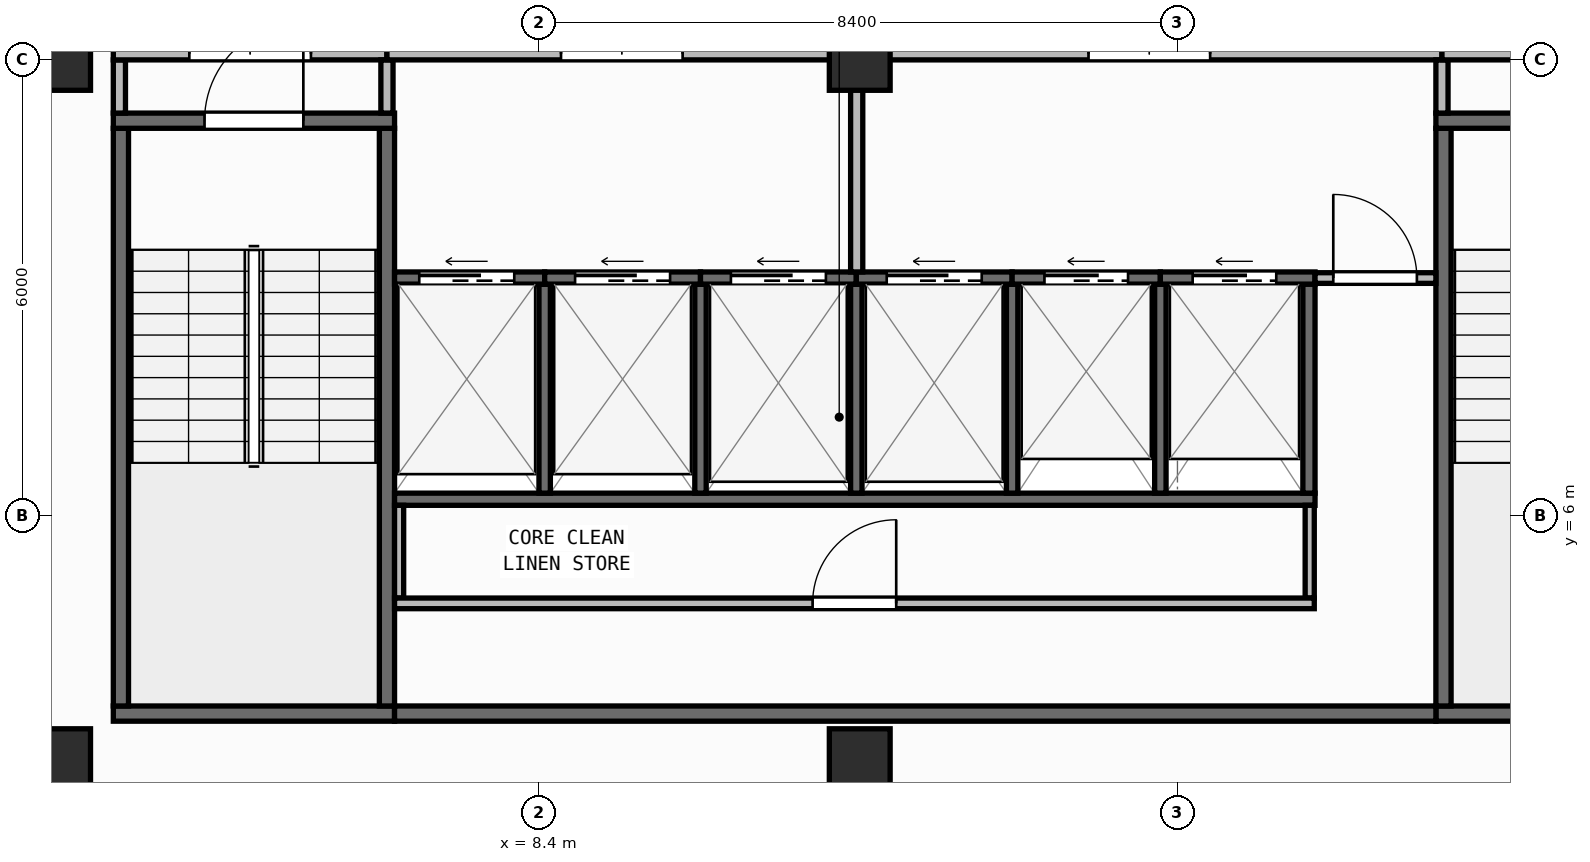
"""IFC4 building model, lengths in metres.
Left out: names, types, materials, properties, quantities, classifications, styles, units other than length and angle.
Written with IfcOpenShell. Run it as: python <this file> out.ifc"""

import sys

from ifc_helpers import new_model, si_unit, direction, frame, frame_2d, origin, origin_2d, place, context, subcontext, project, spatial, rectangle, extrude, element, fill, save


model = new_model("IFC4")
c1 = context("Model", 3, precision=1e-05, world=origin(), true_north=direction((0.0, 1.0)))
c2 = subcontext(c1, "Body", "Model", "MODEL_VIEW")
j1 = project(units=[si_unit("LENGTHUNIT", "METRE"), si_unit("PLANEANGLEUNIT", "RADIAN")], contexts=[c1])
p1 = place(None, origin())
s1 = spatial("IfcSite", under=j1, at=p1, CompositionType="ELEMENT")
p2 = place(p1, origin())
s2 = spatial("IfcBuilding", under=s1, at=p2, CompositionType="ELEMENT")
p3 = place(p2, frame((0.0, 0.0, 292.1)))
s3 = spatial("IfcBuildingStorey", under=s2, at=p3, CompositionType="ELEMENT", Elevation=292.1)
for number, where, z_axis, x_axis in (
    (1, (2.1, 2.8, 0.0), (0.0, 0.0, 1.0), (1.0, 0.0, 0.0)),
    (2, (12.62, 2.8, 0.0), (0.0, 0.0, 1.0), (1.0, 0.0, 0.0)),
    (3, (2.1, 12.0, 0.0), (0.0, 0.0, 1.0), (1.0, 0.0, 0.0)),
    (4, (12.62, 12.0, 0.0), (0.0, 0.0, 1.0), (1.0, 0.0, 0.0)),
):
    element("IfcColumn", number, at=place(p3, frame(where, z_axis=z_axis, x_axis=x_axis)), inside=s3, PredefinedType="COLUMN", context=c2, shape_type="SweptSolid", body=[
        extrude(rectangle(XDim=0.8, YDim=0.8, at=origin_2d()), origin(), (0.0, 0.0, 1.0), 3.95),
    ])
p4 = place(p3, frame((2.46, 0.171, 0.0), z_axis=(0.0, 0.0, 1.0), x_axis=(0.997760665813, 0.066885377746, 0.0)))
e5 = element("IfcWall", 5, at=p4, inside=s3, PredefinedType="STANDARD", context=c2, shape_type="SweptSolid", body=[
    extrude(rectangle(XDim=35.56, YDim=0.26, at=frame_2d((17.78, 0.0))), origin(), (0.0, 0.0, 1.0), 3.71),
])
p5 = place(p4, frame((16.58, 0.0, 0.9)))
e6 = element("IfcOpeningElement", 6, at=p5, cuts=e5, PredefinedType="OPENING", context=c2, shape_type="SweptSolid", body=[
    extrude(rectangle(XDim=2.4, YDim=1.65, at=frame_2d((1.2, 0.825))), frame((0.0, 0.14, 0.0), z_axis=(0.0, -1.0, 0.0), x_axis=(1.0, 0.0, 0.0)), (0.0, 0.0, 1.0), 0.28),
])
p6 = place(p3, frame((2.8, 3.4, 0.0), z_axis=(0.0, 0.0, 1.0), x_axis=(1.0, 0.0, 0.0)))
e7 = element("IfcWall", 7, at=p6, inside=s3, PredefinedType="SHEAR", context=c2, shape_type="SweptSolid", body=[
    extrude(rectangle(XDim=3.7, YDim=0.2, at=frame_2d((1.85, 0.0))), origin(), (0.0, 0.0, 1.0), 3.71),
])
for number, where, z_axis, x_axis in (
    (8, (2.9, 3.5, 0.0), (0.0, 0.0, 1.0), (0.0, 1.0, 0.0)),
    (9, (6.4, 3.5, 0.0), (0.0, 0.0, 1.0), (0.0, 1.0, 0.0)),
):
    element("IfcWall", number, at=place(p3, frame(where, z_axis=z_axis, x_axis=x_axis)), inside=s3, PredefinedType="SHEAR", context=c2, shape_type="SweptSolid", body=[
        extrude(rectangle(XDim=7.6, YDim=0.2, at=frame_2d((3.8, 0.0))), origin(), (0.0, 0.0, 1.0), 3.71),
    ])
p7 = place(p3, frame((2.8, 11.2, 0.0), z_axis=(0.0, 0.0, 1.0), x_axis=(1.0, 0.0, 0.0)))
e10 = element("IfcWall", 10, at=p7, inside=s3, PredefinedType="SHEAR", context=c2, shape_type="SweptSolid", body=[
    extrude(rectangle(XDim=3.7, YDim=0.2, at=frame_2d((1.85, 0.0))), origin(), (0.0, 0.0, 1.0), 3.71),
])
p8 = place(p7, frame((1.2, 0.0, 0.0)))
e11 = element("IfcOpeningElement", 11, at=p8, cuts=e10, PredefinedType="OPENING", context=c2, shape_type="SweptSolid", body=[
    extrude(rectangle(XDim=1.3, YDim=2.15, at=frame_2d((0.65, 1.075))), frame((0.0, 0.11, 0.0), z_axis=(0.0, -1.0, 0.0), x_axis=(1.0, 0.0, 0.0)), (0.0, 0.0, 1.0), 0.22),
])
p9 = place(p3, frame((20.2, 3.4, 0.0), z_axis=(0.0, 0.0, 1.0), x_axis=(1.0, 0.0, 0.0)))
e12 = element("IfcWall", 12, at=p9, inside=s3, PredefinedType="SHEAR", context=c2, shape_type="SweptSolid", body=[
    extrude(rectangle(XDim=3.7, YDim=0.2, at=frame_2d((1.85, 0.0))), origin(), (0.0, 0.0, 1.0), 3.71),
])
p10 = place(p3, frame((20.3, 3.5, 0.0), z_axis=(0.0, 0.0, 1.0), x_axis=(0.0, 1.0, 0.0)))
e13 = element("IfcWall", 13, at=p10, inside=s3, PredefinedType="SHEAR", context=c2, shape_type="SweptSolid", body=[
    extrude(rectangle(XDim=7.6, YDim=0.2, at=frame_2d((3.8, 0.0))), origin(), (0.0, 0.0, 1.0), 3.71),
])
p11 = place(p3, frame((20.2, 11.2, 0.0), z_axis=(0.0, 0.0, 1.0), x_axis=(1.0, 0.0, 0.0)))
e14 = element("IfcWall", 14, at=p11, inside=s3, PredefinedType="SHEAR", context=c2, shape_type="SweptSolid", body=[
    extrude(rectangle(XDim=3.7, YDim=0.2, at=frame_2d((1.85, 0.0))), origin(), (0.0, 0.0, 1.0), 3.71),
])
p12 = place(p11, frame((1.2, 0.0, 0.0)))
e15 = element("IfcOpeningElement", 15, at=p12, cuts=e14, PredefinedType="OPENING", context=c2, shape_type="SweptSolid", body=[
    extrude(rectangle(XDim=1.3, YDim=2.15, at=frame_2d((0.65, 1.075))), frame((0.0, 0.11, 0.0), z_axis=(0.0, -1.0, 0.0), x_axis=(1.0, 0.0, 0.0)), (0.0, 0.0, 1.0), 0.22),
])
p13 = place(p3, frame((6.5, 3.4, 0.0), z_axis=(0.0, 0.0, 1.0), x_axis=(1.0, 0.0, 0.0)))
e16 = element("IfcWall", 16, at=p13, inside=s3, PredefinedType="SHEAR", context=c2, shape_type="SweptSolid", body=[
    extrude(rectangle(XDim=13.7, YDim=0.2, at=frame_2d((6.85, 0.0))), origin(), (0.0, 0.0, 1.0), 3.71),
])
p14 = place(p3, frame((6.5, 6.22, 0.0), z_axis=(0.0, 0.0, 1.0), x_axis=(1.0, 0.0, 0.0)))
e17 = element("IfcWall", 17, at=p14, inside=s3, PredefinedType="SHEAR", context=c2, shape_type="SweptSolid", body=[
    extrude(rectangle(XDim=12.11, YDim=0.16, at=frame_2d((6.055, 0.0))), origin(), (0.0, 0.0, 1.0), 3.71),
])
p15 = place(p3, frame((18.53, 6.3, 0.0), z_axis=(0.0, 0.0, 1.0), x_axis=(0.0, 1.0, 0.0)))
e18 = element("IfcWall", 18, at=p15, inside=s3, PredefinedType="SHEAR", context=c2, shape_type="SweptSolid", body=[
    extrude(rectangle(XDim=2.75, YDim=0.16, at=frame_2d((1.375, 0.0))), origin(), (0.0, 0.0, 1.0), 3.71),
])
for number, where, z_axis, x_axis in (
    (19, (8.475, 6.3, 0.0), (0.0, 0.0, 1.0), (0.0, 1.0, 0.0)),
    (20, (10.525, 6.3, 0.0), (0.0, 0.0, 1.0), (0.0, 1.0, 0.0)),
    (21, (12.575, 6.3, 0.0), (0.0, 0.0, 1.0), (0.0, 1.0, 0.0)),
    (22, (14.625, 6.3, 0.0), (0.0, 0.0, 1.0), (0.0, 1.0, 0.0)),
    (23, (16.575, 6.3, 0.0), (0.0, 0.0, 1.0), (0.0, 1.0, 0.0)),
):
    element("IfcWall", number, at=place(p3, frame(where, z_axis=z_axis, x_axis=x_axis)), inside=s3, PredefinedType="SHEAR", context=c2, shape_type="SweptSolid", body=[
        extrude(rectangle(XDim=2.75, YDim=0.15, at=frame_2d((1.375, 0.0))), origin(), (0.0, 0.0, 1.0), 3.71),
    ])
p16 = place(p3, frame((6.5, 9.13, 0.0), z_axis=(0.0, 0.0, 1.0), x_axis=(1.0, 0.0, 0.0)))
e24 = element("IfcWall", 24, at=p16, inside=s3, PredefinedType="SHEAR", context=c2, shape_type="SweptSolid", body=[
    extrude(rectangle(XDim=1.975, YDim=0.16, at=frame_2d((0.988, 0.0))), origin(), (0.0, 0.0, 1.0), 3.71),
])
p17 = place(p16, frame((0.325, 0.0, 0.0)))
e25 = element("IfcOpeningElement", 25, at=p17, cuts=e24, PredefinedType="OPENING", context=c2, shape_type="SweptSolid", body=[
    extrude(rectangle(XDim=1.25, YDim=2.15, at=frame_2d((0.625, 1.075))), frame((0.0, 0.09, 0.0), z_axis=(0.0, -1.0, 0.0), x_axis=(1.0, 0.0, 0.0)), (0.0, 0.0, 1.0), 0.18),
])
p18 = place(p3, frame((8.475, 9.13, 0.0), z_axis=(0.0, 0.0, 1.0), x_axis=(1.0, 0.0, 0.0)))
e26 = element("IfcWall", 26, at=p18, inside=s3, PredefinedType="SHEAR", context=c2, shape_type="SweptSolid", body=[
    extrude(rectangle(XDim=2.05, YDim=0.16, at=frame_2d((1.025, 0.0))), origin(), (0.0, 0.0, 1.0), 3.71),
])
p19 = place(p18, frame((0.4, 0.0, 0.0)))
e27 = element("IfcOpeningElement", 27, at=p19, cuts=e26, PredefinedType="OPENING", context=c2, shape_type="SweptSolid", body=[
    extrude(rectangle(XDim=1.25, YDim=2.15, at=frame_2d((0.625, 1.075))), frame((0.0, 0.09, 0.0), z_axis=(0.0, -1.0, 0.0), x_axis=(1.0, 0.0, 0.0)), (0.0, 0.0, 1.0), 0.18),
])
p20 = place(p3, frame((10.525, 9.13, 0.0), z_axis=(0.0, 0.0, 1.0), x_axis=(1.0, 0.0, 0.0)))
e28 = element("IfcWall", 28, at=p20, inside=s3, PredefinedType="SHEAR", context=c2, shape_type="SweptSolid", body=[
    extrude(rectangle(XDim=2.05, YDim=0.16, at=frame_2d((1.025, 0.0))), origin(), (0.0, 0.0, 1.0), 3.71),
])
p21 = place(p20, frame((0.4, 0.0, 0.0)))
e29 = element("IfcOpeningElement", 29, at=p21, cuts=e28, PredefinedType="OPENING", context=c2, shape_type="SweptSolid", body=[
    extrude(rectangle(XDim=1.25, YDim=2.15, at=frame_2d((0.625, 1.075))), frame((0.0, 0.09, 0.0), z_axis=(0.0, -1.0, 0.0), x_axis=(1.0, 0.0, 0.0)), (0.0, 0.0, 1.0), 0.18),
])
p22 = place(p3, frame((12.575, 9.13, 0.0), z_axis=(0.0, 0.0, 1.0), x_axis=(1.0, 0.0, 0.0)))
e30 = element("IfcWall", 30, at=p22, inside=s3, PredefinedType="SHEAR", context=c2, shape_type="SweptSolid", body=[
    extrude(rectangle(XDim=2.05, YDim=0.16, at=frame_2d((1.025, 0.0))), origin(), (0.0, 0.0, 1.0), 3.71),
])
p23 = place(p22, frame((0.4, 0.0, 0.0)))
e31 = element("IfcOpeningElement", 31, at=p23, cuts=e30, PredefinedType="OPENING", context=c2, shape_type="SweptSolid", body=[
    extrude(rectangle(XDim=1.25, YDim=2.15, at=frame_2d((0.625, 1.075))), frame((0.0, 0.09, 0.0), z_axis=(0.0, -1.0, 0.0), x_axis=(1.0, 0.0, 0.0)), (0.0, 0.0, 1.0), 0.18),
])
p24 = place(p3, frame((14.625, 9.13, 0.0), z_axis=(0.0, 0.0, 1.0), x_axis=(1.0, 0.0, 0.0)))
e32 = element("IfcWall", 32, at=p24, inside=s3, PredefinedType="SHEAR", context=c2, shape_type="SweptSolid", body=[
    extrude(rectangle(XDim=1.95, YDim=0.16, at=frame_2d((0.975, 0.0))), origin(), (0.0, 0.0, 1.0), 3.71),
])
p25 = place(p24, frame((0.425, 0.0, 0.0)))
e33 = element("IfcOpeningElement", 33, at=p25, cuts=e32, PredefinedType="OPENING", context=c2, shape_type="SweptSolid", body=[
    extrude(rectangle(XDim=1.1, YDim=2.15, at=frame_2d((0.55, 1.075))), frame((0.0, 0.09, 0.0), z_axis=(0.0, -1.0, 0.0), x_axis=(1.0, 0.0, 0.0)), (0.0, 0.0, 1.0), 0.18),
])
p26 = place(p3, frame((16.575, 9.13, 0.0), z_axis=(0.0, 0.0, 1.0), x_axis=(1.0, 0.0, 0.0)))
e34 = element("IfcWall", 34, at=p26, inside=s3, PredefinedType="SHEAR", context=c2, shape_type="SweptSolid", body=[
    extrude(rectangle(XDim=2.035, YDim=0.16, at=frame_2d((1.018, 0.0))), origin(), (0.0, 0.0, 1.0), 3.71),
])
p27 = place(p26, frame((0.425, 0.0, 0.0)))
e35 = element("IfcOpeningElement", 35, at=p27, cuts=e34, PredefinedType="OPENING", context=c2, shape_type="SweptSolid", body=[
    extrude(rectangle(XDim=1.1, YDim=2.15, at=frame_2d((0.55, 1.075))), frame((0.0, 0.09, 0.0), z_axis=(0.0, -1.0, 0.0), x_axis=(1.0, 0.0, 0.0)), (0.0, 0.0, 1.0), 0.18),
])
for number, where, z_axis, x_axis in (
    (36, (6.56, 4.92, 0.0), (0.0, 0.0, 1.0), (0.0, 1.0, 0.0)),
    (37, (18.54, 4.92, 0.0), (0.0, 0.0, 1.0), (0.0, 1.0, 0.0)),
):
    element("IfcWall", number, at=place(p3, frame(where, z_axis=z_axis, x_axis=x_axis)), inside=s3, PredefinedType="PARTITIONING", context=c2, shape_type="SweptSolid", body=[
        extrude(rectangle(XDim=1.22, YDim=0.12, at=frame_2d((0.61, 0.0))), origin(), (0.0, 0.0, 1.0), 3.71),
    ])
p28 = place(p3, frame((6.5, 4.85, 0.0), z_axis=(0.0, 0.0, 1.0), x_axis=(1.0, 0.0, 0.0)))
e38 = element("IfcWall", 38, at=p28, inside=s3, PredefinedType="PARTITIONING", context=c2, shape_type="SweptSolid", body=[
    extrude(rectangle(XDim=12.1, YDim=0.14, at=frame_2d((6.05, 0.0))), origin(), (0.0, 0.0, 1.0), 3.71),
])
p29 = place(p28, frame((5.5, 0.0, 0.0)))
e39 = element("IfcOpeningElement", 39, at=p29, cuts=e38, PredefinedType="OPENING", context=c2, shape_type="SweptSolid", body=[
    extrude(rectangle(XDim=1.1, YDim=2.1, at=frame_2d((0.55, 1.05))), frame((0.0, 0.08, 0.0), z_axis=(0.0, -1.0, 0.0), x_axis=(1.0, 0.0, 0.0)), (0.0, 0.0, 1.0), 0.16),
])
p30 = place(p3, frame((18.61, 9.13, 0.0), z_axis=(0.0, 0.0, 1.0), x_axis=(1.0, 0.0, 0.0)))
e40 = element("IfcWall", 40, at=p30, inside=s3, PredefinedType="PARTITIONING", context=c2, shape_type="SweptSolid", body=[
    extrude(rectangle(XDim=1.59, YDim=0.14, at=frame_2d((0.795, 0.0))), origin(), (0.0, 0.0, 1.0), 3.71),
])
p31 = place(p30, frame((0.24, 0.0, 0.0)))
e41 = element("IfcOpeningElement", 41, at=p31, cuts=e40, PredefinedType="OPENING", context=c2, shape_type="SweptSolid", body=[
    extrude(rectangle(XDim=1.1, YDim=2.1, at=frame_2d((0.55, 1.05))), frame((0.0, 0.08, 0.0), z_axis=(0.0, -1.0, 0.0), x_axis=(1.0, 0.0, 0.0)), (0.0, 0.0, 1.0), 0.16),
])
p32 = place(p3, frame((2.88, 11.3, 0.0), z_axis=(0.0, 0.0, 1.0), x_axis=(0.0, 1.0, 0.0)))
e42 = element("IfcWall", 42, at=p32, inside=s3, PredefinedType="PARTITIONING", context=c2, shape_type="SweptSolid", body=[
    extrude(rectangle(XDim=0.7, YDim=0.16, at=frame_2d((0.35, 0.0))), origin(), (0.0, 0.0, 1.0), 3.71),
])
p33 = place(p3, frame((2.8, 12.08, 0.0), z_axis=(0.0, 0.0, 1.0), x_axis=(1.0, 0.0, 0.0)))
e43 = element("IfcWall", 43, at=p33, inside=s3, PredefinedType="PARTITIONING", context=c2, shape_type="SweptSolid", body=[
    extrude(rectangle(XDim=3.6, YDim=0.16, at=frame_2d((1.8, 0.0))), origin(), (0.0, 0.0, 1.0), 3.157),
])
p34 = place(p33, frame((1.0, 0.0, 0.0)))
e44 = element("IfcOpeningElement", 44, at=p34, cuts=e43, PredefinedType="OPENING", context=c2, shape_type="SweptSolid", body=[
    extrude(rectangle(XDim=1.6, YDim=2.05, at=frame_2d((0.8, 1.025))), frame((0.0, 0.09, 0.0), z_axis=(0.0, -1.0, 0.0), x_axis=(1.0, 0.0, 0.0)), (0.0, 0.0, 1.0), 0.18),
])
p35 = place(p3, frame((6.4, 11.3, 0.0), z_axis=(0.0, 0.0, 1.0), x_axis=(0.0, 1.0, 0.0)))
e45 = element("IfcWall", 45, at=p35, inside=s3, PredefinedType="PARTITIONING", context=c2, shape_type="SweptSolid", body=[
    extrude(rectangle(XDim=0.7, YDim=0.16, at=frame_2d((0.35, 0.0))), origin(), (0.0, 0.0, 1.0), 3.71),
])
p36 = place(p3, frame((6.4, 12.08, 0.0), z_axis=(0.0, 0.0, 1.0), x_axis=(1.0, 0.0, 0.0)))
e46 = element("IfcWall", 46, at=p36, inside=s3, PredefinedType="PARTITIONING", context=c2, shape_type="SweptSolid", body=[
    extrude(rectangle(XDim=6.18, YDim=0.16, at=frame_2d((3.09, 0.0))), origin(), (0.0, 0.0, 1.0), 3.157),
])
p37 = place(p36, frame((2.29, 0.0, 0.0)))
e47 = element("IfcOpeningElement", 47, at=p37, cuts=e46, PredefinedType="OPENING", context=c2, shape_type="SweptSolid", body=[
    extrude(rectangle(XDim=1.6, YDim=2.05, at=frame_2d((0.8, 1.025))), frame((0.0, 0.09, 0.0), z_axis=(0.0, -1.0, 0.0), x_axis=(1.0, 0.0, 0.0)), (0.0, 0.0, 1.0), 0.18),
])
p38 = place(p3, frame((12.58, 9.21, 0.0), z_axis=(0.0, 0.0, 1.0), x_axis=(0.0, 1.0, 0.0)))
e48 = element("IfcWall", 48, at=p38, inside=s3, PredefinedType="PARTITIONING", context=c2, shape_type="SweptSolid", body=[
    extrude(rectangle(XDim=2.79, YDim=0.16, at=frame_2d((1.395, 0.0))), origin(), (0.0, 0.0, 1.0), 3.71),
])
p39 = place(p3, frame((12.58, 12.08, 0.0), z_axis=(0.0, 0.0, 1.0), x_axis=(1.0, 0.0, 0.0)))
e49 = element("IfcWall", 49, at=p39, inside=s3, PredefinedType="PARTITIONING", context=c2, shape_type="SweptSolid", body=[
    extrude(rectangle(XDim=7.7, YDim=0.16, at=frame_2d((3.85, 0.0))), origin(), (0.0, 0.0, 1.0), 3.157),
])
p40 = place(p39, frame((3.05, 0.0, 0.0)))
e50 = element("IfcOpeningElement", 50, at=p40, cuts=e49, PredefinedType="OPENING", context=c2, shape_type="SweptSolid", body=[
    extrude(rectangle(XDim=1.6, YDim=2.05, at=frame_2d((0.8, 1.025))), frame((0.0, 0.09, 0.0), z_axis=(0.0, -1.0, 0.0), x_axis=(1.0, 0.0, 0.0)), (0.0, 0.0, 1.0), 0.18),
])
p41 = place(p3, frame((20.28, 11.3, 0.0), z_axis=(0.0, 0.0, 1.0), x_axis=(0.0, 1.0, 0.0)))
e51 = element("IfcWall", 51, at=p41, inside=s3, PredefinedType="PARTITIONING", context=c2, shape_type="SweptSolid", body=[
    extrude(rectangle(XDim=0.7, YDim=0.16, at=frame_2d((0.35, 0.0))), origin(), (0.0, 0.0, 1.0), 3.71),
])
p42 = place(p3, frame((20.28, 12.08, 0.0), z_axis=(0.0, 0.0, 1.0), x_axis=(1.0, 0.0, 0.0)))
e52 = element("IfcWall", 52, at=p42, inside=s3, PredefinedType="PARTITIONING", context=c2, shape_type="SweptSolid", body=[
    extrude(rectangle(XDim=3.62, YDim=0.16, at=frame_2d((1.81, 0.0))), origin(), (0.0, 0.0, 1.0), 3.157),
])
p43 = place(p42, frame((1.01, 0.0, 0.0)))
e53 = element("IfcOpeningElement", 53, at=p43, cuts=e52, PredefinedType="OPENING", context=c2, shape_type="SweptSolid", body=[
    extrude(rectangle(XDim=1.6, YDim=2.05, at=frame_2d((0.8, 1.025))), frame((0.0, 0.09, 0.0), z_axis=(0.0, -1.0, 0.0), x_axis=(1.0, 0.0, 0.0)), (0.0, 0.0, 1.0), 0.18),
])
p44 = place(p8, origin())
e54 = element("IfcDoor", 54, at=p44, inside=s3, OperationType="SINGLE_SWING_RIGHT", PredefinedType="DOOR", context=c2, shape_type="SweptSolid", body=[
    extrude(rectangle(XDim=1.3, YDim=2.15, at=frame_2d((0.65, 1.075))), frame((0.0, 0.025, 0.0), z_axis=(0.0, -1.0, 0.0), x_axis=(1.0, 0.0, 0.0)), (0.0, 0.0, 1.0), 0.05),
])
fill(e11, e54)
p45 = place(p17, origin())
e55 = element("IfcDoor", 55, at=p45, inside=s3, OperationType="SLIDING_TO_LEFT", PredefinedType="DOOR", context=c2, shape_type="SweptSolid", body=[
    extrude(rectangle(XDim=1.25, YDim=2.15, at=frame_2d((0.625, 1.075))), frame((0.0, 0.025, 0.0), z_axis=(0.0, -1.0, 0.0), x_axis=(1.0, 0.0, 0.0)), (0.0, 0.0, 1.0), 0.05),
])
fill(e25, e55)
p46 = place(p19, origin())
e56 = element("IfcDoor", 56, at=p46, inside=s3, OperationType="SLIDING_TO_LEFT", PredefinedType="DOOR", context=c2, shape_type="SweptSolid", body=[
    extrude(rectangle(XDim=1.25, YDim=2.15, at=frame_2d((0.625, 1.075))), frame((0.0, 0.025, 0.0), z_axis=(0.0, -1.0, 0.0), x_axis=(1.0, 0.0, 0.0)), (0.0, 0.0, 1.0), 0.05),
])
fill(e27, e56)
p47 = place(p21, origin())
e57 = element("IfcDoor", 57, at=p47, inside=s3, OperationType="SLIDING_TO_LEFT", PredefinedType="DOOR", context=c2, shape_type="SweptSolid", body=[
    extrude(rectangle(XDim=1.25, YDim=2.15, at=frame_2d((0.625, 1.075))), frame((0.0, 0.025, 0.0), z_axis=(0.0, -1.0, 0.0), x_axis=(1.0, 0.0, 0.0)), (0.0, 0.0, 1.0), 0.05),
])
fill(e29, e57)
p48 = place(p23, origin())
e58 = element("IfcDoor", 58, at=p48, inside=s3, OperationType="SLIDING_TO_LEFT", PredefinedType="DOOR", context=c2, shape_type="SweptSolid", body=[
    extrude(rectangle(XDim=1.25, YDim=2.15, at=frame_2d((0.625, 1.075))), frame((0.0, 0.025, 0.0), z_axis=(0.0, -1.0, 0.0), x_axis=(1.0, 0.0, 0.0)), (0.0, 0.0, 1.0), 0.05),
])
fill(e31, e58)
p49 = place(p25, origin())
e59 = element("IfcDoor", 59, at=p49, inside=s3, OperationType="SLIDING_TO_LEFT", PredefinedType="DOOR", context=c2, shape_type="SweptSolid", body=[
    extrude(rectangle(XDim=1.1, YDim=2.15, at=frame_2d((0.55, 1.075))), frame((0.0, 0.025, 0.0), z_axis=(0.0, -1.0, 0.0), x_axis=(1.0, 0.0, 0.0)), (0.0, 0.0, 1.0), 0.05),
])
fill(e33, e59)
p50 = place(p27, origin())
e60 = element("IfcDoor", 60, at=p50, inside=s3, OperationType="SLIDING_TO_LEFT", PredefinedType="DOOR", context=c2, shape_type="SweptSolid", body=[
    extrude(rectangle(XDim=1.1, YDim=2.15, at=frame_2d((0.55, 1.075))), frame((0.0, 0.025, 0.0), z_axis=(0.0, -1.0, 0.0), x_axis=(1.0, 0.0, 0.0)), (0.0, 0.0, 1.0), 0.05),
])
fill(e35, e60)
p51 = place(p29, origin())
e61 = element("IfcDoor", 61, at=p51, inside=s3, OperationType="SINGLE_SWING_RIGHT", PredefinedType="DOOR", context=c2, shape_type="SweptSolid", body=[
    extrude(rectangle(XDim=1.1, YDim=2.1, at=frame_2d((0.55, 1.05))), frame((0.0, 0.025, 0.0), z_axis=(0.0, -1.0, 0.0), x_axis=(1.0, 0.0, 0.0)), (0.0, 0.0, 1.0), 0.05),
])
fill(e39, e61)
p52 = place(p31, origin())
e62 = element("IfcDoor", 62, at=p52, inside=s3, OperationType="SINGLE_SWING_LEFT", PredefinedType="DOOR", context=c2, shape_type="SweptSolid", body=[
    extrude(rectangle(XDim=1.1, YDim=2.1, at=frame_2d((0.55, 1.05))), frame((0.0, 0.025, 0.0), z_axis=(0.0, -1.0, 0.0), x_axis=(1.0, 0.0, 0.0)), (0.0, 0.0, 1.0), 0.05),
])
fill(e41, e62)
p53 = place(p34, origin())
e63 = element("IfcDoor", 63, at=p53, inside=s3, OperationType="DOUBLE_DOOR_SINGLE_SWING", PredefinedType="DOOR", context=c2, shape_type="SweptSolid", body=[
    extrude(rectangle(XDim=1.6, YDim=2.05, at=frame_2d((0.8, 1.025))), frame((0.0, 0.025, 0.0), z_axis=(0.0, -1.0, 0.0), x_axis=(1.0, 0.0, 0.0)), (0.0, 0.0, 1.0), 0.05),
])
fill(e44, e63)
p54 = place(p37, origin())
e64 = element("IfcDoor", 64, at=p54, inside=s3, OperationType="DOUBLE_DOOR_SINGLE_SWING", PredefinedType="DOOR", context=c2, shape_type="SweptSolid", body=[
    extrude(rectangle(XDim=1.6, YDim=2.05, at=frame_2d((0.8, 1.025))), frame((0.0, 0.025, 0.0), z_axis=(0.0, -1.0, 0.0), x_axis=(1.0, 0.0, 0.0)), (0.0, 0.0, 1.0), 0.05),
])
fill(e47, e64)
p55 = place(p40, origin())
e65 = element("IfcDoor", 65, at=p55, inside=s3, OperationType="DOUBLE_DOOR_SINGLE_SWING", PredefinedType="DOOR", context=c2, shape_type="SweptSolid", body=[
    extrude(rectangle(XDim=1.6, YDim=2.05, at=frame_2d((0.8, 1.025))), frame((0.0, 0.025, 0.0), z_axis=(0.0, -1.0, 0.0), x_axis=(1.0, 0.0, 0.0)), (0.0, 0.0, 1.0), 0.05),
])
fill(e50, e65)
save(model, sys.argv[1])
